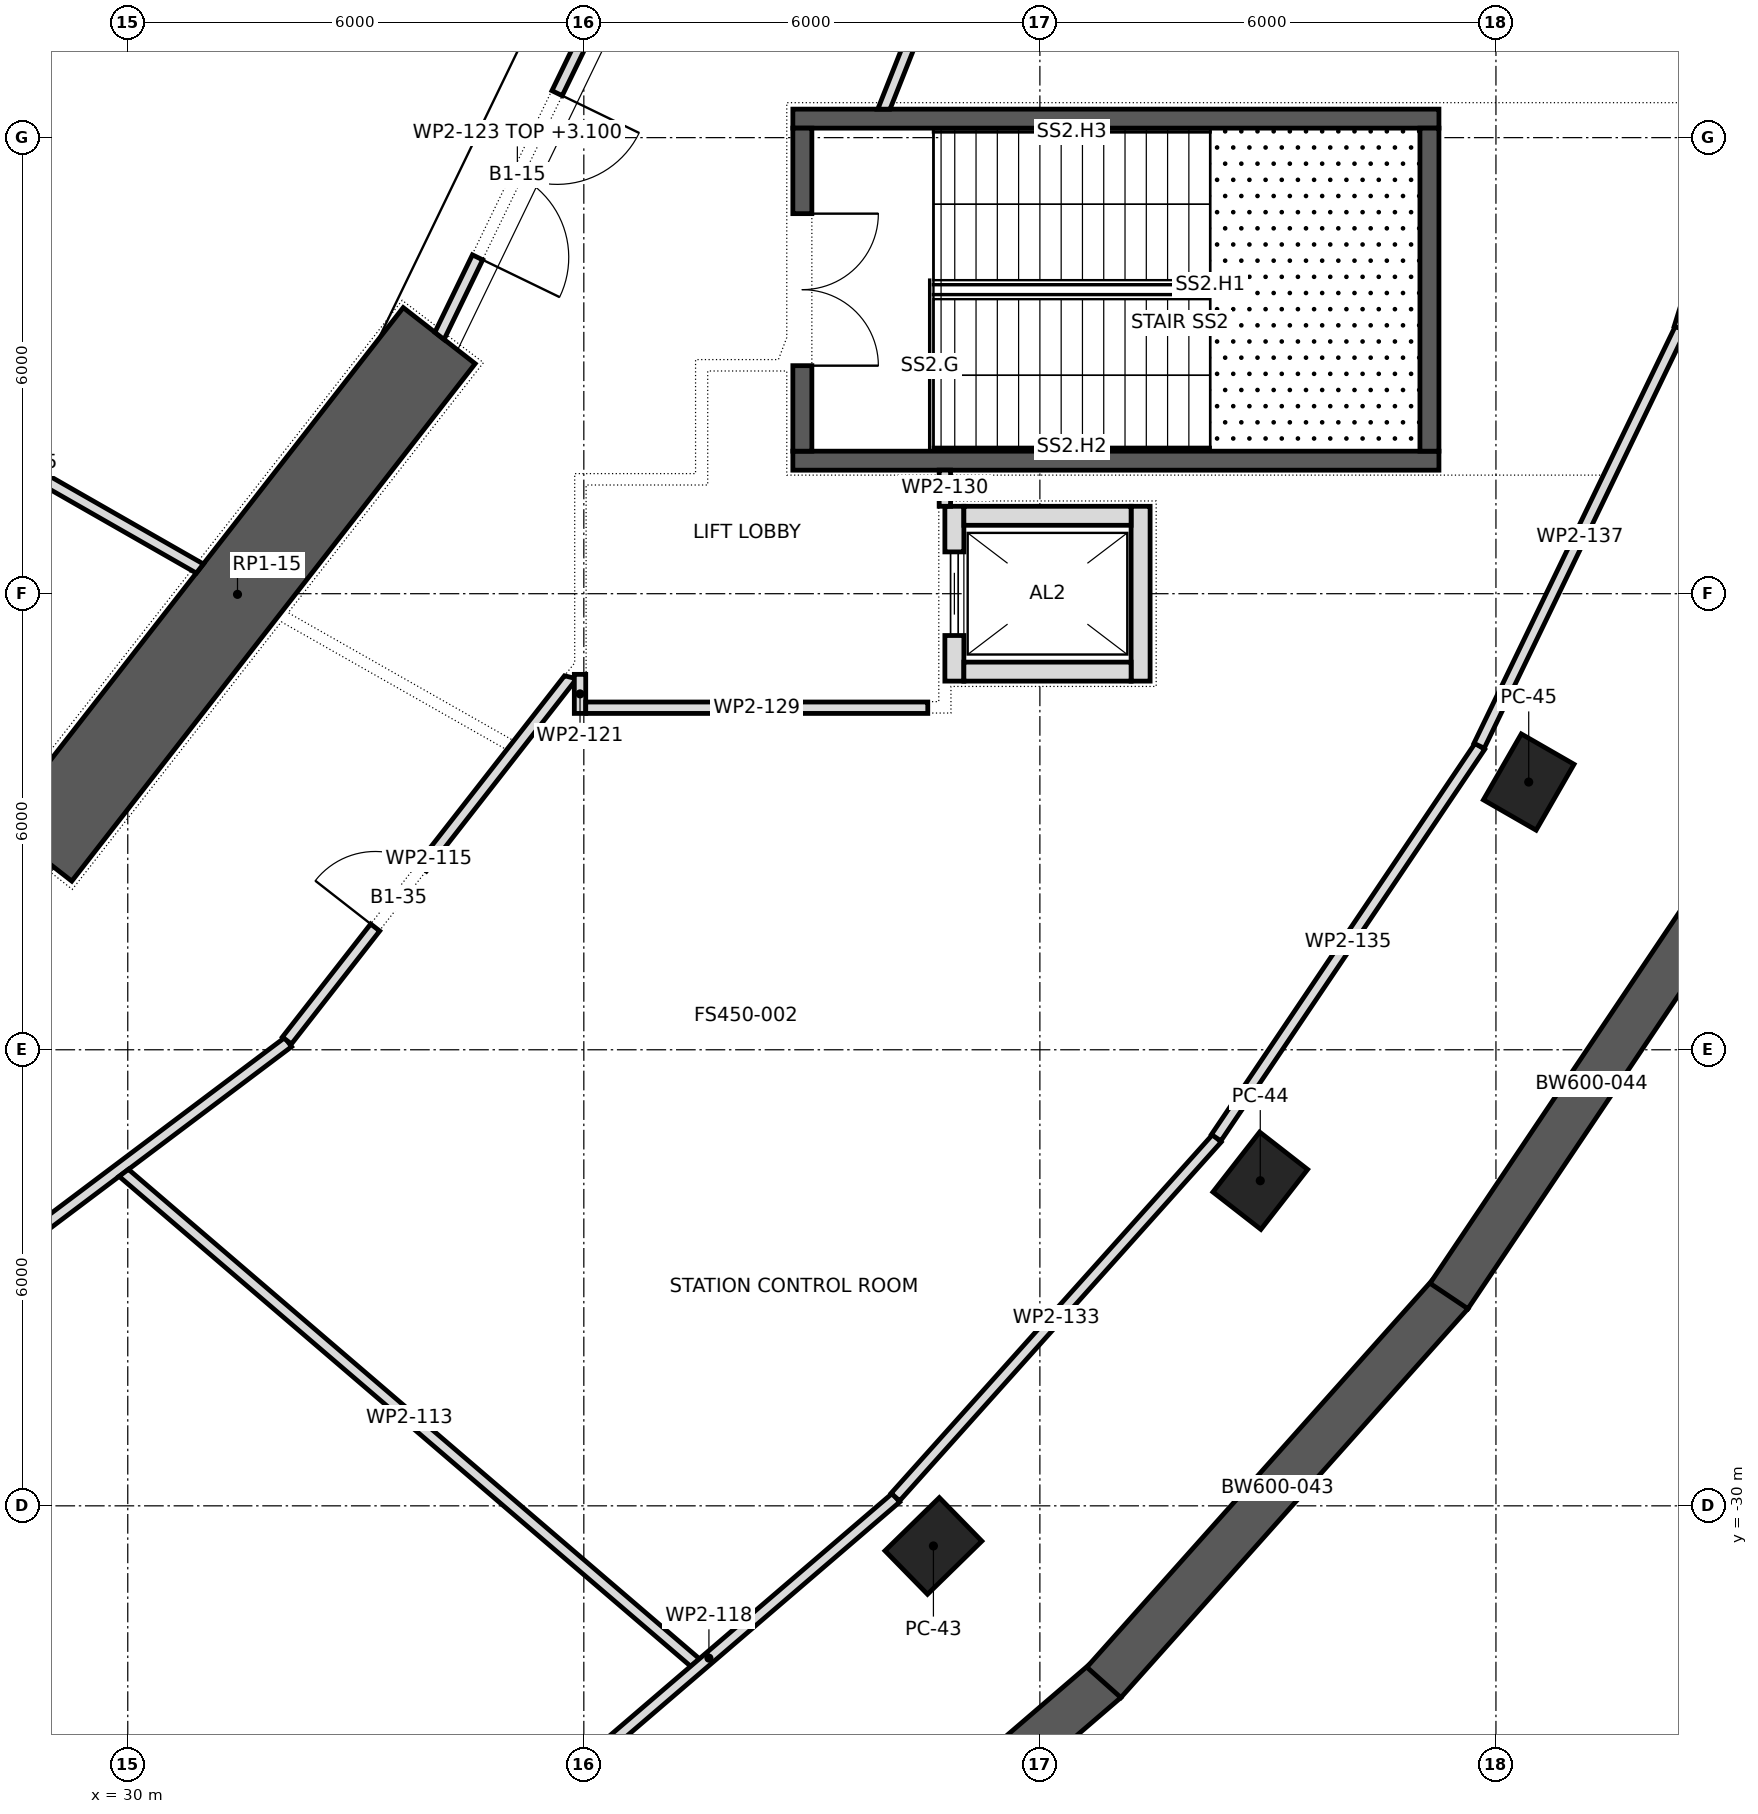
"""IFC4 building model, lengths in metres.
Left out: names, types, materials, properties, quantities, classifications, styles, units other than length and angle.
Written with IfcOpenShell. Run it as: python <this file> out.ifc"""

import sys

from ifc_helpers import new_model, si_unit, direction, frame, frame_2d, origin, origin_2d, place, context, subcontext, project, spatial, polyline, rectangle, outline, extrude, element, fill, save


model = new_model("IFC4")
c1 = context("Model", 3, precision=1e-05, world=origin(), true_north=direction((0.0, 1.0)))
c2 = subcontext(c1, "Body", "Model", "MODEL_VIEW")
j1 = project(units=[si_unit("LENGTHUNIT", "METRE"), si_unit("PLANEANGLEUNIT", "RADIAN")], contexts=[c1])
p1 = place(None, origin())
s1 = spatial("IfcSite", under=j1, at=p1, CompositionType="ELEMENT")
p2 = place(p1, origin())
s2 = spatial("IfcBuilding", under=s1, at=p2, CompositionType="ELEMENT")
p3 = place(p2, frame((0.0, 0.0, -4.0)))
s3 = spatial("IfcBuildingStorey", under=s2, at=p3, CompositionType="ELEMENT", Elevation=-4.0)
for number, where, z_axis, x_axis in (
    (1, (40.599, -30.528, 0.0), (0.0, 0.0, 1.0), (0.715, 0.699, 0.0)),
    (2, (44.899, -25.723, 0.0), (0.0, 0.0, 1.0), (0.615, 0.789, 0.0)),
    (3, (48.431, -20.478, 0.0), (0.0, 0.0, 1.0), (0.499, 0.867, 0.0)),
):
    element("IfcColumn", number, at=place(p3, frame(where, z_axis=z_axis, x_axis=x_axis)), inside=s3, PredefinedType="COLUMN", context=c2, shape_type="SweptSolid", body=[
        extrude(rectangle(XDim=1.0, YDim=0.8, at=origin_2d()), origin(), (0.0, 0.0, 1.0), 4.0),
    ])
p4 = place(p3, frame((28.79, -21.412, 0.0), z_axis=(0.0, 0.0, 1.0), x_axis=(0.614825322247, 0.788663314174, 0.0)))
e4 = element("IfcWall", 4, at=p4, inside=s3, PredefinedType="SHEAR", context=c2, shape_type="SweptSolid", body=[
    extrude(rectangle(XDim=8.632, YDim=1.2, at=frame_2d((4.316, 0.0))), origin(), (0.0, 0.0, 1.0), 4.0),
])
p5 = place(p3, frame((37.568, -36.853, 0.0), z_axis=(0.0, 0.0, 1.0), x_axis=(0.758319142722, 0.65188348482, 0.0)))
e5 = element("IfcWall", 5, at=p5, inside=s3, PredefinedType="SOLIDWALL", context=c2, shape_type="SweptSolid", body=[
    extrude(rectangle(XDim=6.991, YDim=0.6, at=frame_2d((3.496, 0.0))), origin(), (0.0, 0.0, 1.0), 4.0),
])
p6 = place(p3, frame((42.842, -32.323, 0.0), z_axis=(0.0, 0.0, 1.0), x_axis=(0.665894053378, 0.74604631872, 0.0)))
e6 = element("IfcWall", 6, at=p6, inside=s3, PredefinedType="SOLIDWALL", context=c2, shape_type="SweptSolid", body=[
    extrude(rectangle(XDim=6.856, YDim=0.6, at=frame_2d((3.428, 0.0))), origin(), (0.0, 0.0, 1.0), 4.0),
])
p7 = place(p3, frame((47.382, -27.24, 0.0), z_axis=(0.0, 0.0, 1.0), x_axis=(0.557518861869, 0.830164272093, 0.0)))
e7 = element("IfcWall", 7, at=p7, inside=s3, PredefinedType="SOLIDWALL", context=c2, shape_type="SweptSolid", body=[
    extrude(rectangle(XDim=6.729, YDim=0.6, at=frame_2d((3.364, 0.0))), origin(), (0.0, 0.0, 1.0), 4.0),
])
for number, where, z_axis, x_axis in (
    (8, (38.75, -11.75, 0.0), (0.0, 0.0, 1.0), (1.0, 0.0, 0.0)),
    (9, (38.75, -16.25, 0.0), (0.0, 0.0, 1.0), (1.0, 0.0, 0.0)),
):
    element("IfcWall", number, at=place(p3, frame(where, z_axis=z_axis, x_axis=x_axis)), inside=s3, PredefinedType="SHEAR", context=c2, shape_type="SweptSolid", body=[
        extrude(rectangle(XDim=8.5, YDim=0.25, at=frame_2d((4.25, 0.0))), origin(), (0.0, 0.0, 1.0), 3.55),
    ])
p8 = place(p3, frame((38.875, -16.125, 0.0), z_axis=(0.0, 0.0, 1.0), x_axis=(0.0, 1.0, 0.0)))
e10 = element("IfcWall", 10, at=p8, inside=s3, PredefinedType="SHEAR", context=c2, shape_type="SweptSolid", body=[
    extrude(rectangle(XDim=4.25, YDim=0.25, at=frame_2d((2.125, 0.0))), origin(), (0.0, 0.0, 1.0), 3.55),
])
p9 = place(p8, frame((1.125, 0.0, 0.0)))
e11 = element("IfcOpeningElement", 11, at=p9, cuts=e10, PredefinedType="OPENING", context=c2, shape_type="SweptSolid", body=[
    extrude(rectangle(XDim=2.0, YDim=2.1, at=frame_2d((1.0, 1.05))), frame((0.0, 0.137, 0.0), z_axis=(0.0, -1.0, 0.0), x_axis=(1.0, 0.0, 0.0)), (0.0, 0.0, 1.0), 0.274),
])
p10 = place(p3, frame((47.125, -16.125, 0.0), z_axis=(0.0, 0.0, 1.0), x_axis=(0.0, 1.0, 0.0)))
e12 = element("IfcWall", 12, at=p10, inside=s3, PredefinedType="SHEAR", context=c2, shape_type="SweptSolid", body=[
    extrude(rectangle(XDim=4.25, YDim=0.25, at=frame_2d((2.125, 0.0))), origin(), (0.0, 0.0, 1.0), 3.55),
])
p11 = place(p3, frame((40.875, -19.15, 0.0), z_axis=(0.0, 0.0, 1.0), x_axis=(0.0, 1.0, 0.0)))
e13 = element("IfcWall", 13, at=p11, inside=s3, PredefinedType="PARTITIONING", context=c2, shape_type="SweptSolid", body=[
    extrude(rectangle(XDim=2.3, YDim=0.25, at=frame_2d((1.15, 0.0))), origin(), (0.0, 0.0, 1.0), 3.55),
])
p12 = place(p11, frame((0.6, 0.0, 0.0)))
e14 = element("IfcOpeningElement", 14, at=p12, cuts=e13, PredefinedType="OPENING", context=c2, shape_type="SweptSolid", body=[
    extrude(rectangle(XDim=1.1, YDim=2.1, at=frame_2d((0.55, 1.05))), frame((0.0, 0.137, 0.0), z_axis=(0.0, -1.0, 0.0), x_axis=(1.0, 0.0, 0.0)), (0.0, 0.0, 1.0), 0.274),
])
p13 = place(p3, frame((43.325, -19.15, 0.0), z_axis=(0.0, 0.0, 1.0), x_axis=(0.0, 1.0, 0.0)))
e15 = element("IfcWall", 15, at=p13, inside=s3, PredefinedType="PARTITIONING", context=c2, shape_type="SweptSolid", body=[
    extrude(rectangle(XDim=2.3, YDim=0.25, at=frame_2d((1.15, 0.0))), origin(), (0.0, 0.0, 1.0), 3.55),
])
for number, where, z_axis, x_axis in (
    (16, (41.0, -16.975, 0.0), (0.0, 0.0, 1.0), (1.0, 0.0, 0.0)),
    (17, (41.0, -19.025, 0.0), (0.0, 0.0, 1.0), (1.0, 0.0, 0.0)),
):
    element("IfcWall", number, at=place(p3, frame(where, z_axis=z_axis, x_axis=x_axis)), inside=s3, PredefinedType="PARTITIONING", context=c2, shape_type="SweptSolid", body=[
        extrude(rectangle(XDim=2.2, YDim=0.25, at=frame_2d((1.1, 0.0))), origin(), (0.0, 0.0, 1.0), 3.55),
    ])
p14 = place(p3, frame((23.696, -30.228, 0.0), z_axis=(0.0, 0.0, 1.0), x_axis=(0.799195100787, 0.601071701944, 0.0)))
e18 = element("IfcWall", 18, at=p14, inside=s3, PredefinedType="PARTITIONING", context=c2, shape_type="SweptSolid", body=[
    extrude(rectangle(XDim=10.529, YDim=0.15, at=frame_2d((5.264, 0.0))), origin(), (0.0, 0.0, 1.0), 3.55),
])
p15 = place(p3, frame((26.074, -14.882, 0.0), z_axis=(0.0, 0.0, 1.0), x_axis=(0.868133416031, -0.496330909746, 0.0)))
e19 = element("IfcWall", 19, at=p15, inside=s3, PredefinedType="PARTITIONING", context=c2, shape_type="SweptSolid", body=[
    extrude(outline(polyline([(0.0, -0.075), (5.604, -0.075), (5.626, 0.075), (0.0, 0.075), (0.0, -0.075)])), origin(), (0.0, 0.0, 1.0), 3.55),
])
p16 = place(p3, frame((29.947, -25.619, 0.0), z_axis=(0.0, 0.0, 1.0), x_axis=(0.759265306208, -0.650781218836, 0.0)))
e20 = element("IfcWall", 20, at=p16, inside=s3, PredefinedType="PARTITIONING", context=c2, shape_type="SweptSolid", body=[
    extrude(outline(polyline([(-0.017, -0.075), (9.888, -0.075), (9.911, 0.075), (0.017, 0.075), (-0.017, -0.075)])), origin(), (0.0, 0.0, 1.0), 3.55),
])
p17 = place(p3, frame((32.094, -23.878, 0.0), z_axis=(0.0, 0.0, 1.0), x_axis=(0.615450256232, 0.788175730472, 0.0)))
e21 = element("IfcWall", 21, at=p17, inside=s3, PredefinedType="PARTITIONING", context=c2, shape_type="SweptSolid", body=[
    extrude(outline(polyline([(0.0, -0.075), (6.097, -0.075), (6.03, 0.075), (0.0, 0.075), (0.0, -0.075)])), origin(), (0.0, 0.0, 1.0), 3.55),
])
p18 = place(p17, frame((1.887, 0.0, 0.0)))
e22 = element("IfcOpeningElement", 22, at=p18, cuts=e21, PredefinedType="OPENING", context=c2, shape_type="SweptSolid", body=[
    extrude(rectangle(XDim=1.0, YDim=2.1, at=frame_2d((0.5, 1.05))), frame((0.0, 0.087, 0.0), z_axis=(0.0, -1.0, 0.0), x_axis=(1.0, 0.0, 0.0)), (0.0, 0.0, 1.0), 0.174),
])
p19 = place(p3, frame((35.185, -34.114, 0.0), z_axis=(0.0, 0.0, 1.0), x_axis=(0.759033312601, 0.651051787773, 0.0)))
e23 = element("IfcWall", 23, at=p19, inside=s3, PredefinedType="PARTITIONING", context=c2, shape_type="SweptSolid", body=[
    extrude(rectangle(XDim=6.484, YDim=0.15, at=frame_2d((3.242, 0.0))), origin(), (0.0, 0.0, 1.0), 3.55),
])
p20 = place(p3, frame((35.95, -19.575, 0.0), z_axis=(0.0, 0.0, 1.0), x_axis=(0.0, 1.0, 0.0)))
e24 = element("IfcWall", 24, at=p20, inside=s3, PredefinedType="PARTITIONING", context=c2, shape_type="SweptSolid", body=[
    extrude(rectangle(XDim=0.514, YDim=0.15, at=frame_2d((0.257, 0.0))), origin(), (0.0, 0.0, 1.0), 3.55),
])
p21 = place(p3, frame((36.15, -10.38, 0.0), z_axis=(0.0, 0.0, 1.0), x_axis=(-0.436102687495, -0.899896908518, 0.0)))
e25 = element("IfcWall", 25, at=p21, inside=s3, PredefinedType="PARTITIONING", context=c2, shape_type="SweptSolid", body=[
    extrude(outline(polyline([(0.017, -0.075), (4.683, -0.075), (4.715, 0.075), (-0.017, 0.075), (0.017, -0.075)])), origin(), (0.0, 0.0, 1.0), 3.1),
])
p22 = place(p21, frame((1.15, 0.0, 0.0)))
e26 = element("IfcOpeningElement", 26, at=p22, cuts=e25, PredefinedType="OPENING", context=c2, shape_type="SweptSolid", body=[
    extrude(rectangle(XDim=2.4, YDim=2.1, at=frame_2d((1.2, 1.05))), frame((0.0, 0.087, 0.0), z_axis=(0.0, -1.0, 0.0), x_axis=(1.0, 0.0, 0.0)), (0.0, 0.0, 1.0), 0.174),
])
p23 = place(p3, frame((39.948, -11.625, 0.0), z_axis=(0.0, 0.0, 1.0), x_axis=(0.368047556164, 0.92980696728, 0.0)))
e27 = element("IfcWall", 27, at=p23, inside=s3, PredefinedType="PARTITIONING", context=c2, shape_type="SweptSolid", body=[
    extrude(outline(polyline([(0.03, -0.075), (4.914, -0.075), (4.914, 0.075), (-0.03, 0.075), (0.03, -0.075)])), origin(), (0.0, 0.0, 1.0), 3.55),
])
p24 = place(p3, frame((40.525, -19.5, 0.0), z_axis=(0.0, 0.0, 1.0), x_axis=(-1.0, 0.0, 0.0)))
e28 = element("IfcWall", 28, at=p24, inside=s3, PredefinedType="PARTITIONING", context=c2, shape_type="SweptSolid", body=[
    extrude(rectangle(XDim=4.5, YDim=0.15, at=frame_2d((2.25, 0.0))), origin(), (0.0, 0.0, 1.0), 3.55),
])
p25 = place(p3, frame((40.75, -16.374, 0.0), z_axis=(0.0, 0.0, 1.0), x_axis=(0.0, -1.0, 0.0)))
e29 = element("IfcWall", 29, at=p25, inside=s3, PredefinedType="PARTITIONING", context=c2, shape_type="SweptSolid", body=[
    extrude(rectangle(XDim=0.476, YDim=0.15, at=frame_2d((0.238, 0.0))), origin(), (0.0, 0.0, 1.0), 3.55),
])
p26 = place(p3, frame((44.329, -25.165, 0.0), z_axis=(0.0, 0.0, 1.0), x_axis=(-0.6673947824, -0.744704105283, 0.0)))
e30 = element("IfcWall", 30, at=p26, inside=s3, PredefinedType="PARTITIONING", context=c2, shape_type="SweptSolid", body=[
    extrude(rectangle(XDim=6.338, YDim=0.15, at=frame_2d((3.169, 0.0))), origin(), (0.0, 0.0, 1.0), 3.55),
])
p27 = place(p3, frame((47.789, -20.007, 0.0), z_axis=(0.0, 0.0, 1.0), x_axis=(-0.558812320082, -0.829294152231, 0.0)))
e31 = element("IfcWall", 31, at=p27, inside=s3, PredefinedType="PARTITIONING", context=c2, shape_type="SweptSolid", body=[
    extrude(rectangle(XDim=6.21, YDim=0.15, at=frame_2d((3.105, 0.0))), origin(), (0.0, 0.0, 1.0), 3.55),
])
p28 = place(p3, frame((50.428, -14.511, 0.0), z_axis=(0.0, 0.0, 1.0), x_axis=(-0.434690826011, -0.900579749818, 0.0)))
e32 = element("IfcWall", 32, at=p28, inside=s3, PredefinedType="PARTITIONING", context=c2, shape_type="SweptSolid", body=[
    extrude(rectangle(XDim=6.096, YDim=0.15, at=frame_2d((3.048, 0.0))), origin(), (0.0, 0.0, 1.0), 3.55),
])
p29 = place(p3, frame((50.416, -14.506, 0.0), z_axis=(0.0, 0.0, 1.0), x_axis=(0.297713123711, 0.954655380737, 0.0)))
e33 = element("IfcWall", 33, at=p29, inside=s3, PredefinedType="PARTITIONING", context=c2, shape_type="SweptSolid", body=[
    extrude(rectangle(XDim=6.013, YDim=0.15, at=frame_2d((3.006, 0.0))), origin(), (0.0, 0.0, 1.0), 3.55),
])
p30 = place(p12, origin())
e34 = element("IfcDoor", 34, at=p30, inside=s3, OperationType="SLIDING_TO_LEFT", PredefinedType="DOOR", context=c2, shape_type="SweptSolid", body=[
    extrude(rectangle(XDim=1.1, YDim=2.1, at=frame_2d((0.55, 1.05))), frame((0.0, 0.025, 0.0), z_axis=(0.0, -1.0, 0.0), x_axis=(1.0, 0.0, 0.0)), (0.0, 0.0, 1.0), 0.05),
])
fill(e14, e34)
p31 = place(p9, frame((2.0, 0.0, 0.0), z_axis=(0.0, 0.0, 1.0), x_axis=(-1.0, 0.0, 0.0)))
e35 = element("IfcDoor", 35, at=p31, inside=s3, OperationType="DOUBLE_DOOR_SINGLE_SWING", PredefinedType="DOOR", context=c2, shape_type="SweptSolid", body=[
    extrude(rectangle(XDim=2.0, YDim=2.1, at=frame_2d((1.0, 1.05))), frame((0.0, 0.025, 0.0), z_axis=(0.0, -1.0, 0.0), x_axis=(1.0, 0.0, 0.0)), (0.0, 0.0, 1.0), 0.05),
])
fill(e11, e35)
p32 = place(p22, origin())
e36 = element("IfcDoor", 36, at=p32, inside=s3, OperationType="DOUBLE_DOOR_SINGLE_SWING", PredefinedType="DOOR", context=c2, shape_type="SweptSolid", body=[
    extrude(rectangle(XDim=2.4, YDim=2.1, at=frame_2d((1.2, 1.05))), frame((0.0, 0.025, 0.0), z_axis=(0.0, -1.0, 0.0), x_axis=(1.0, 0.0, 0.0)), (0.0, 0.0, 1.0), 0.05),
])
fill(e26, e36)
p33 = place(p18, origin())
e37 = element("IfcDoor", 37, at=p33, inside=s3, OperationType="SINGLE_SWING_RIGHT", PredefinedType="DOOR", context=c2, shape_type="SweptSolid", body=[
    extrude(rectangle(XDim=1.0, YDim=2.1, at=frame_2d((0.5, 1.05))), frame((0.0, 0.025, 0.0), z_axis=(0.0, -1.0, 0.0), x_axis=(1.0, 0.0, 0.0)), (0.0, 0.0, 1.0), 0.05),
])
fill(e22, e37)
save(model, sys.argv[1])
